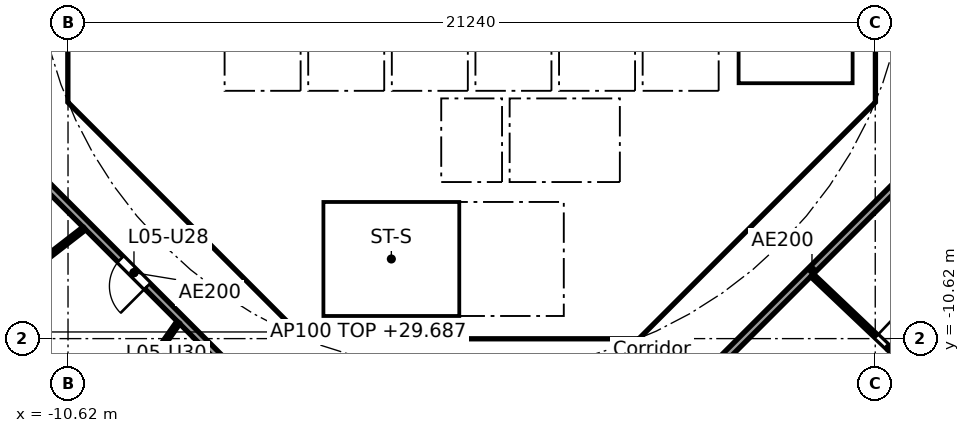
"""IFC4 building model, lengths in metres.
Left out: names, types, materials, properties, quantities, classifications, styles, units other than length and angle.
Written with IfcOpenShell. Run it as: python <this file> out.ifc"""

import sys

from ifc_helpers import new_model, si_unit, direction, frame, frame_2d, origin, place, context, subcontext, project, spatial, polyline, rectangle, outline, extrude, element, fill, save


model = new_model("IFC4")
c1 = context("Model", 3, precision=1e-05, world=origin(), true_north=direction((0.0, 1.0)))
c2 = subcontext(c1, "Body", "Model", "MODEL_VIEW")
j1 = project(units=[si_unit("LENGTHUNIT", "METRE"), si_unit("PLANEANGLEUNIT", "RADIAN")], contexts=[c1])
p1 = place(None, origin())
s1 = spatial("IfcSite", under=j1, at=p1, CompositionType="ELEMENT")
p2 = place(p1, origin())
s2 = spatial("IfcBuilding", under=s1, at=p2, CompositionType="ELEMENT")
p3 = place(p2, frame((0.0, 0.0, 27.0)))
s3 = spatial("IfcBuildingStorey", under=s2, at=p3, CompositionType="ELEMENT", Elevation=27.0)
p4 = place(p3, frame((-10.325, 3.801, 0.0), z_axis=(0.0, 0.0, 1.0), x_axis=(0.0, -1.0, 0.0)))
e1 = element("IfcWall", 1, at=p4, inside=s3, PredefinedType="SHEAR", context=c2, shape_type="SweptSolid", body=[
    extrude(rectangle(XDim=7.602, YDim=0.6, at=frame_2d((3.801, 0.0))), origin(), (0.0, 0.0, 1.0), 3.44),
])
p5 = place(p4, frame((0.651, 0.0, 0.0)))
e2 = element("IfcOpeningElement", 2, at=p5, cuts=e1, PredefinedType="OPENING", context=c2, shape_type="SweptSolid", body=[
    extrude(rectangle(XDim=1.5, YDim=2.1, at=frame_2d((0.75, 1.05))), frame((0.0, 0.31, 0.0), z_axis=(0.0, -1.0, 0.0), x_axis=(1.0, 0.0, 0.0)), (0.0, 0.0, 1.0), 0.62),
])
p6 = place(p4, frame((5.451, 0.0, 0.0)))
e3 = element("IfcOpeningElement", 3, at=p6, cuts=e1, PredefinedType="OPENING", context=c2, shape_type="SweptSolid", body=[
    extrude(rectangle(XDim=1.5, YDim=2.1, at=frame_2d((0.75, 1.05))), frame((0.0, 0.31, 0.0), z_axis=(0.0, -1.0, 0.0), x_axis=(1.0, 0.0, 0.0)), (0.0, 0.0, 1.0), 0.62),
])
p7 = place(p3, frame((-9.988, -4.613, 0.0), z_axis=(0.0, 0.0, 1.0), x_axis=(0.707106781187, -0.707106781187, 0.0)))
e4 = element("IfcWall", 4, at=p7, inside=s3, PredefinedType="SHEAR", context=c2, shape_type="SweptSolid", body=[
    extrude(rectangle(XDim=7.602, YDim=0.6, at=frame_2d((3.801, 0.0))), origin(), (0.0, 0.0, 1.0), 3.44),
])
p8 = place(p7, frame((6.151, 0.0, 0.0)))
e5 = element("IfcOpeningElement", 5, at=p8, cuts=e4, PredefinedType="OPENING", context=c2, shape_type="SweptSolid", body=[
    extrude(rectangle(XDim=1.1, YDim=2.1, at=frame_2d((0.55, 1.05))), frame((0.0, 0.31, 0.0), z_axis=(0.0, -1.0, 0.0), x_axis=(1.0, 0.0, 0.0)), (0.0, 0.0, 1.0), 0.62),
])
p9 = place(p3, frame((4.613, -9.988, 0.0), z_axis=(0.0, 0.0, 1.0), x_axis=(0.707106781187, 0.707106781187, 0.0)))
e6 = element("IfcWall", 6, at=p9, inside=s3, PredefinedType="SHEAR", context=c2, shape_type="SweptSolid", body=[
    extrude(rectangle(XDim=7.602, YDim=0.6, at=frame_2d((3.801, 0.0))), origin(), (0.0, 0.0, 1.0), 3.44),
])
p10 = place(p9, frame((3.201, 0.0, 0.0)))
e7 = element("IfcOpeningElement", 7, at=p10, cuts=e6, PredefinedType="OPENING", context=c2, shape_type="SweptSolid", body=[
    extrude(rectangle(XDim=1.2, YDim=2.1, at=frame_2d((0.6, 1.05))), frame((0.0, 0.31, 0.0), z_axis=(0.0, -1.0, 0.0), x_axis=(1.0, 0.0, 0.0)), (0.0, 0.0, 1.0), 0.62),
])
p11 = place(p3, frame((4.0, -10.025, 0.0), z_axis=(0.0, 0.0, 1.0), x_axis=(0.0, 1.0, 0.0)))
e8 = element("IfcWall", 8, at=p11, inside=s3, PredefinedType="SOLIDWALL", context=c2, shape_type="SweptSolid", body=[
    extrude(rectangle(XDim=3.0, YDim=0.2, at=frame_2d((1.5, 0.0))), origin(), (0.0, 0.0, 1.0), 3.44),
])
p12 = place(p11, frame((0.975, 0.0, 0.0)))
e9 = element("IfcOpeningElement", 9, at=p12, cuts=e8, PredefinedType="OPENING", context=c2, shape_type="SweptSolid", body=[
    extrude(rectangle(XDim=1.1, YDim=2.1, at=frame_2d((0.55, 1.05))), frame((0.0, 0.11, 0.0), z_axis=(0.0, -1.0, 0.0), x_axis=(1.0, 0.0, 0.0)), (0.0, 0.0, 1.0), 0.22),
])
p13 = place(p3, frame((-5.8, -8.227, 0.0), z_axis=(0.0, 0.0, 1.0), x_axis=(0.0, 1.0, 0.0)))
e10 = element("IfcWall", 10, at=p13, inside=s3, PredefinedType="PARTITIONING", context=c2, shape_type="SweptSolid", body=[
    extrude(rectangle(XDim=3.927, YDim=0.15, at=frame_2d((1.963, 0.0))), origin(), (0.0, 0.0, 1.0), 3.44),
])
p14 = place(p13, frame((2.615, 0.0, 0.0)))
e11 = element("IfcOpeningElement", 11, at=p14, cuts=e10, PredefinedType="OPENING", context=c2, shape_type="SweptSolid", body=[
    extrude(rectangle(XDim=0.9, YDim=2.1, at=frame_2d((0.45, 1.05))), frame((0.0, 0.085, 0.0), z_axis=(0.0, -1.0, 0.0), x_axis=(1.0, 0.0, 0.0)), (0.0, 0.0, 1.0), 0.17),
])
p15 = place(p13, frame((0.539, 0.0, 0.0)))
e12 = element("IfcOpeningElement", 12, at=p15, cuts=e10, PredefinedType="OPENING", context=c2, shape_type="SweptSolid", body=[
    extrude(rectangle(XDim=0.9, YDim=2.1, at=frame_2d((0.45, 1.05))), frame((0.0, 0.085, 0.0), z_axis=(0.0, -1.0, 0.0), x_axis=(1.0, 0.0, 0.0)), (0.0, 0.0, 1.0), 0.17),
])
p16 = place(p3, frame((4.0, -6.5, 0.0), z_axis=(0.0, 0.0, 1.0), x_axis=(0.0, 1.0, 0.0)))
e13 = element("IfcWall", 13, at=p16, inside=s3, PredefinedType="SOLIDWALL", context=c2, shape_type="SweptSolid", body=[
    extrude(rectangle(XDim=2.2, YDim=0.2, at=frame_2d((1.1, 0.0))), origin(), (0.0, 0.0, 1.0), 3.44),
])
p17 = place(p16, frame((0.55, 0.0, 0.0)))
e14 = element("IfcOpeningElement", 14, at=p17, cuts=e13, PredefinedType="OPENING", context=c2, shape_type="SweptSolid", body=[
    extrude(rectangle(XDim=1.1, YDim=2.1, at=frame_2d((0.55, 1.05))), frame((0.0, 0.11, 0.0), z_axis=(0.0, -1.0, 0.0), x_axis=(1.0, 0.0, 0.0)), (0.0, 0.0, 1.0), 0.22),
])
p18 = place(p3, frame((-4.0, -6.5, 0.0), z_axis=(0.0, 0.0, 1.0), x_axis=(0.0, 1.0, 0.0)))
e15 = element("IfcWall", 15, at=p18, inside=s3, PredefinedType="SOLIDWALL", context=c2, shape_type="SweptSolid", body=[
    extrude(rectangle(XDim=2.2, YDim=0.2, at=frame_2d((1.1, 0.0))), origin(), (0.0, 0.0, 1.0), 3.44),
])
p19 = place(p18, frame((0.65, 0.0, 0.0)))
e16 = element("IfcOpeningElement", 16, at=p19, cuts=e15, PredefinedType="OPENING", context=c2, shape_type="SweptSolid", body=[
    extrude(rectangle(XDim=0.9, YDim=2.1, at=frame_2d((0.45, 1.05))), frame((0.0, 0.11, 0.0), z_axis=(0.0, -1.0, 0.0), x_axis=(1.0, 0.0, 0.0)), (0.0, 0.0, 1.0), 0.22),
])
p20 = place(p3, origin())
e17 = element("IfcWall", 17, at=p20, inside=s3, PredefinedType="SHEAR", context=c2, shape_type="SweptSolid", body=[
    extrude(outline(polyline([(-10.625, -3.801), (-10.025, -3.801), (-10.025, -4.152), (-9.776, -4.401), (-10.2, -4.825), (-10.625, -4.401), (-10.625, -3.801)])), origin(), (0.0, 0.0, 1.0), 3.44),
])
p21 = place(p3, origin())
e18 = element("IfcWall", 18, at=p21, inside=s3, PredefinedType="SHEAR", context=c2, shape_type="SweptSolid", body=[
    extrude(outline(polyline([(-4.152, -10.025), (4.152, -10.025), (4.401, -9.776), (4.825, -10.2), (4.401, -10.625), (-4.401, -10.625), (-4.825, -10.2), (-4.401, -9.776), (-4.152, -10.025)])), origin(), (0.0, 0.0, 1.0), 3.44),
])
p22 = place(p3, origin())
e19 = element("IfcWall", 19, at=p22, inside=s3, PredefinedType="SHEAR", context=c2, shape_type="SweptSolid", body=[
    extrude(outline(polyline([(9.776, -4.401), (10.025, -4.152), (10.025, -3.801), (10.025, 4.152), (9.776, 4.401), (10.2, 4.825), (10.625, 4.401), (10.625, -4.401), (10.2, -4.825), (9.776, -4.401)])), origin(), (0.0, 0.0, 1.0), 3.44),
])
p23 = place(p3, frame((-10.025, -4.0, 0.0), z_axis=(0.0, 0.0, 1.0), x_axis=(1.0, 0.0, 0.0)))
e20 = element("IfcWall", 20, at=p23, inside=s3, PredefinedType="PARTITIONING", context=c2, shape_type="SweptSolid", body=[
    extrude(rectangle(XDim=3.325, YDim=0.2, at=frame_2d((1.662, 0.0))), origin(), (0.0, 0.0, 1.0), 3.44),
])
p24 = place(p3, frame((-8.001, -6.1, 0.0), z_axis=(0.0, 0.0, 1.0), x_axis=(1.0, 0.0, 0.0)))
e21 = element("IfcWall", 21, at=p24, inside=s3, PredefinedType="PARTITIONING", context=c2, shape_type="SweptSolid", body=[
    extrude(rectangle(XDim=2.126, YDim=0.15, at=frame_2d((1.063, 0.0))), origin(), (0.0, 0.0, 1.0), 3.44),
])
for number, where, z_axis, x_axis in (
    (22, (-0.9, -6.5, 0.0), (0.0, 0.0, 1.0), (0.0, 1.0, 0.0)),
    (23, (0.9, -6.5, 0.0), (0.0, 0.0, 1.0), (0.0, 1.0, 0.0)),
):
    element("IfcWall", number, at=place(p3, frame(where, z_axis=z_axis, x_axis=x_axis)), inside=s3, PredefinedType="SOLIDWALL", context=c2, shape_type="SweptSolid", body=[
        extrude(rectangle(XDim=2.2, YDim=0.2, at=frame_2d((1.1, 0.0))), origin(), (0.0, 0.0, 1.0), 3.44),
    ])
p25 = place(p3, origin())
e24 = element("IfcWall", 24, at=p25, inside=s3, PredefinedType="SOLIDWALL", context=c2, shape_type="SweptSolid", body=[
    extrude(outline(polyline([(-6.7, -2.1), (-6.5, -2.1), (-6.5, -4.1), (-4.5, -4.1), (-4.5, -2.1), (-4.3, -2.1), (-4.3, -4.1), (-2.3, -4.1), (-2.3, -2.1), (-2.1, -2.1), (-2.1, -4.1), (-0.1, -4.1), (-0.1, -2.1), (0.1, -2.1), (0.1, -4.1), (2.1, -4.1), (2.1, -2.1), (2.3, -2.1), (2.3, -4.1), (4.3, -4.1), (4.3, -2.1), (4.5, -2.1), (4.5, -4.1), (6.5, -4.1), (6.5, -2.1), (6.7, -2.1), (6.7, -4.3), (-6.7, -4.3), (-6.7, -2.1)])), origin(), (0.0, 0.0, 1.0), 3.44),
])
p26 = place(p3, origin())
e25 = element("IfcWall", 25, at=p26, inside=s3, PredefinedType="SOLIDWALL", context=c2, shape_type="SweptSolid", body=[
    extrude(outline(polyline([(-3.9, -10.025), (-4.1, -10.025), (-4.1, -7.025), (-3.9, -7.025), (-3.9, -10.025)])), origin(), (0.0, 0.0, 1.0), 3.44),
])
p27 = place(p3, origin())
e26 = element("IfcWall", 26, at=p27, inside=s3, PredefinedType="SOLIDWALL", context=c2, shape_type="SweptSolid", body=[
    extrude(outline(polyline([(4.1, -7.025), (-4.1, -7.025), (-4.1, -6.5), (4.1, -6.5), (4.1, -7.025)])), origin(), (0.0, 0.0, 1.0), 3.44),
])
p28 = place(p3, origin())
e27 = element("IfcWall", 27, at=p28, inside=s3, PredefinedType="SOLIDWALL", context=c2, shape_type="SweptSolid", body=[
    extrude(outline(polyline([(7.025, -3.9), (6.7, -3.9), (6.7, 3.9), (7.025, 3.9), (7.025, -3.9)])), origin(), (0.0, 0.0, 1.0), 3.44),
])
p29 = place(p3, origin())
e28 = element("IfcWall", 28, at=p29, inside=s3, PredefinedType="SOLIDWALL", context=c2, shape_type="SweptSolid", body=[
    extrude(outline(polyline([(10.025, -4.1), (6.7, -4.1), (6.7, -3.9), (10.025, -3.9), (10.025, -4.1)])), origin(), (0.0, 0.0, 1.0), 3.44),
])
p30 = place(p3, frame((-12.635, -5.134, 0.0), z_axis=(0.0, 0.0, 1.0), x_axis=(0.707106781187, -0.707106781187, 0.0)))
e29 = element("IfcWall", 29, at=p30, inside=s3, PredefinedType="PARTITIONING", context=c2, shape_type="SweptSolid", body=[
    extrude(rectangle(XDim=10.609, YDim=0.2, at=frame_2d((5.305, 0.0))), origin(), (0.0, 0.0, 1.0), 3.44),
])
p31 = place(p30, frame((4.804, 0.0, 0.0)))
e30 = element("IfcOpeningElement", 30, at=p31, cuts=e29, PredefinedType="OPENING", context=c2, shape_type="SweptSolid", body=[
    extrude(rectangle(XDim=1.0, YDim=2.1, at=frame_2d((0.5, 1.05))), frame((0.0, 0.11, 0.0), z_axis=(0.0, -1.0, 0.0), x_axis=(1.0, 0.0, 0.0)), (0.0, 0.0, 1.0), 0.22),
])
p32 = place(p3, frame((5.275, -12.494, 0.0), z_axis=(0.0, 0.0, 1.0), x_axis=(0.707106781187, 0.707106781187, 0.0)))
e31 = element("IfcWall", 31, at=p32, inside=s3, PredefinedType="PARTITIONING", context=c2, shape_type="SweptSolid", body=[
    extrude(rectangle(XDim=10.409, YDim=0.2, at=frame_2d((5.205, 0.0))), origin(), (0.0, 0.0, 1.0), 3.44),
])
p33 = place(p3, frame((-10.19, -7.719, 0.0), z_axis=(0.0, 0.0, 1.0), x_axis=(-0.790264549439, -0.612765813259, 0.0)))
e32 = element("IfcWall", 32, at=p33, inside=s3, PredefinedType="PARTITIONING", context=c2, shape_type="SweptSolid", body=[
    extrude(rectangle(XDim=8.896, YDim=0.1, at=frame_2d((4.448, 0.0))), origin(), (0.0, 0.0, 1.0), 2.687),
])
p34 = place(p33, frame((1.448, 0.0, 0.0)))
e33 = element("IfcOpeningElement", 33, at=p34, cuts=e32, PredefinedType="OPENING", context=c2, shape_type="SweptSolid", body=[
    extrude(rectangle(XDim=0.9, YDim=2.1, at=frame_2d((0.45, 1.05))), frame((0.0, 0.06, 0.0), z_axis=(0.0, -1.0, 0.0), x_axis=(1.0, 0.0, 0.0)), (0.0, 0.0, 1.0), 0.12),
])
p35 = place(p33, frame((5.871, 0.0, 0.0)))
e34 = element("IfcOpeningElement", 34, at=p35, cuts=e32, PredefinedType="OPENING", context=c2, shape_type="SweptSolid", body=[
    extrude(rectangle(XDim=0.9, YDim=2.1, at=frame_2d((0.45, 1.05))), frame((0.0, 0.06, 0.0), z_axis=(0.0, -1.0, 0.0), x_axis=(1.0, 0.0, 0.0)), (0.0, 0.0, 1.0), 0.12),
])
p36 = place(p3, frame((-7.715, -10.193, 0.0), z_axis=(0.0, 0.0, 1.0), x_axis=(-0.573126964124, -0.819466584428, 0.0)))
e35 = element("IfcWall", 35, at=p36, inside=s3, PredefinedType="PARTITIONING", context=c2, shape_type="SweptSolid", body=[
    extrude(rectangle(XDim=15.001, YDim=0.1, at=frame_2d((7.5, 0.0))), origin(), (0.0, 0.0, 1.0), 2.687),
])
p37 = place(p36, frame((1.678, 0.0, 0.0)))
e36 = element("IfcOpeningElement", 36, at=p37, cuts=e35, PredefinedType="OPENING", context=c2, shape_type="SweptSolid", body=[
    extrude(rectangle(XDim=0.9, YDim=2.1, at=frame_2d((0.45, 1.05))), frame((0.0, 0.06, 0.0), z_axis=(0.0, -1.0, 0.0), x_axis=(1.0, 0.0, 0.0)), (0.0, 0.0, 1.0), 0.12),
])
p38 = place(p36, frame((6.631, 0.0, 0.0)))
e37 = element("IfcOpeningElement", 37, at=p38, cuts=e35, PredefinedType="OPENING", context=c2, shape_type="SweptSolid", body=[
    extrude(rectangle(XDim=0.9, YDim=2.1, at=frame_2d((0.45, 1.05))), frame((0.0, 0.06, 0.0), z_axis=(0.0, -1.0, 0.0), x_axis=(1.0, 0.0, 0.0)), (0.0, 0.0, 1.0), 0.12),
])
p39 = place(p3, frame((8.957, -8.953, 0.0), z_axis=(0.0, 0.0, 1.0), x_axis=(0.725250022034, -0.688485588476, 0.0)))
e38 = element("IfcWall", 38, at=p39, inside=s3, PredefinedType="PARTITIONING", context=c2, shape_type="SweptSolid", body=[
    extrude(rectangle(XDim=12.963, YDim=0.1, at=frame_2d((6.481, 0.0))), origin(), (0.0, 0.0, 1.0), 2.687),
])
p40 = place(p39, frame((2.333, 0.0, 0.0)))
e39 = element("IfcOpeningElement", 39, at=p40, cuts=e38, PredefinedType="OPENING", context=c2, shape_type="SweptSolid", body=[
    extrude(rectangle(XDim=0.9, YDim=2.1, at=frame_2d((0.45, 1.05))), frame((0.0, 0.06, 0.0), z_axis=(0.0, -1.0, 0.0), x_axis=(1.0, 0.0, 0.0)), (0.0, 0.0, 1.0), 0.12),
])
p41 = place(p39, frame((8.79, 0.0, 0.0)))
e40 = element("IfcOpeningElement", 40, at=p41, cuts=e38, PredefinedType="OPENING", context=c2, shape_type="SweptSolid", body=[
    extrude(rectangle(XDim=0.9, YDim=2.1, at=frame_2d((0.45, 1.05))), frame((0.0, 0.06, 0.0), z_axis=(0.0, -1.0, 0.0), x_axis=(1.0, 0.0, 0.0)), (0.0, 0.0, 1.0), 0.12),
])
p42 = place(p17, origin())
e41 = element("IfcDoor", 41, at=p42, inside=s3, OperationType="DOUBLE_DOOR_SLIDING", PredefinedType="DOOR", context=c2, shape_type="SweptSolid", body=[
    extrude(rectangle(XDim=1.1, YDim=2.1, at=frame_2d((0.55, 1.05))), frame((0.0, 0.025, 0.0), z_axis=(0.0, -1.0, 0.0), x_axis=(1.0, 0.0, 0.0)), (0.0, 0.0, 1.0), 0.05),
])
fill(e14, e41)
p43 = place(p12, origin())
e42 = element("IfcDoor", 42, at=p43, inside=s3, OperationType="SINGLE_SWING_LEFT", PredefinedType="DOOR", context=c2, shape_type="SweptSolid", body=[
    extrude(rectangle(XDim=1.1, YDim=2.1, at=frame_2d((0.55, 1.05))), frame((0.0, 0.025, 0.0), z_axis=(0.0, -1.0, 0.0), x_axis=(1.0, 0.0, 0.0)), (0.0, 0.0, 1.0), 0.05),
])
fill(e9, e42)
p44 = place(p14, origin())
e43 = element("IfcDoor", 43, at=p44, inside=s3, OperationType="SINGLE_SWING_LEFT", PredefinedType="DOOR", context=c2, shape_type="SweptSolid", body=[
    extrude(rectangle(XDim=0.9, YDim=2.1, at=frame_2d((0.45, 1.05))), frame((0.0, 0.025, 0.0), z_axis=(0.0, -1.0, 0.0), x_axis=(1.0, 0.0, 0.0)), (0.0, 0.0, 1.0), 0.05),
])
fill(e11, e43)
p45 = place(p15, origin())
e44 = element("IfcDoor", 44, at=p45, inside=s3, OperationType="SINGLE_SWING_LEFT", PredefinedType="DOOR", context=c2, shape_type="SweptSolid", body=[
    extrude(rectangle(XDim=0.9, YDim=2.1, at=frame_2d((0.45, 1.05))), frame((0.0, 0.025, 0.0), z_axis=(0.0, -1.0, 0.0), x_axis=(1.0, 0.0, 0.0)), (0.0, 0.0, 1.0), 0.05),
])
fill(e12, e44)
p46 = place(p19, frame((0.9, 0.0, 0.0), x_axis=(-1.0, 0.0, 0.0)))
e45 = element("IfcDoor", 45, at=p46, inside=s3, OperationType="SINGLE_SWING_RIGHT", PredefinedType="DOOR", context=c2, shape_type="SweptSolid", body=[
    extrude(rectangle(XDim=0.9, YDim=2.1, at=frame_2d((0.45, 1.05))), frame((0.0, 0.025, 0.0), z_axis=(0.0, -1.0, 0.0), x_axis=(1.0, 0.0, 0.0)), (0.0, 0.0, 1.0), 0.05),
])
fill(e16, e45)
p47 = place(p10, origin())
e46 = element("IfcDoor", 46, at=p47, inside=s3, OperationType="SINGLE_SWING_LEFT", PredefinedType="DOOR", context=c2, shape_type="SweptSolid", body=[
    extrude(rectangle(XDim=1.2, YDim=2.1, at=frame_2d((0.6, 1.05))), frame((0.0, 0.025, 0.0), z_axis=(0.0, -1.0, 0.0), x_axis=(1.0, 0.0, 0.0)), (0.0, 0.0, 1.0), 0.05),
])
fill(e7, e46)
p48 = place(p6, origin())
e47 = element("IfcDoor", 47, at=p48, inside=s3, OperationType="DOUBLE_DOOR_SINGLE_SWING", PredefinedType="DOOR", context=c2, shape_type="SweptSolid", body=[
    extrude(rectangle(XDim=1.5, YDim=2.1, at=frame_2d((0.75, 1.05))), frame((0.0, 0.025, 0.0), z_axis=(0.0, -1.0, 0.0), x_axis=(1.0, 0.0, 0.0)), (0.0, 0.0, 1.0), 0.05),
])
fill(e3, e47)
p49 = place(p8, origin())
e48 = element("IfcDoor", 48, at=p49, inside=s3, OperationType="SINGLE_SWING_LEFT", PredefinedType="DOOR", context=c2, shape_type="SweptSolid", body=[
    extrude(rectangle(XDim=1.1, YDim=2.1, at=frame_2d((0.55, 1.05))), frame((0.0, 0.025, 0.0), z_axis=(0.0, -1.0, 0.0), x_axis=(1.0, 0.0, 0.0)), (0.0, 0.0, 1.0), 0.05),
])
fill(e5, e48)
p50 = place(p31, frame((1.0, 0.0, 0.0), x_axis=(-1.0, 0.0, 0.0)))
e49 = element("IfcDoor", 49, at=p50, inside=s3, OperationType="SINGLE_SWING_LEFT", PredefinedType="DOOR", context=c2, shape_type="SweptSolid", body=[
    extrude(rectangle(XDim=1.0, YDim=2.1, at=frame_2d((0.5, 1.05))), frame((0.0, 0.025, 0.0), z_axis=(0.0, -1.0, 0.0), x_axis=(1.0, 0.0, 0.0)), (0.0, 0.0, 1.0), 0.05),
])
fill(e30, e49)
p51 = place(p40, origin())
e50 = element("IfcDoor", 50, at=p51, inside=s3, OperationType="SINGLE_SWING_LEFT", PredefinedType="DOOR", context=c2, shape_type="SweptSolid", body=[
    extrude(rectangle(XDim=0.9, YDim=2.1, at=frame_2d((0.45, 1.05))), frame((0.0, 0.025, 0.0), z_axis=(0.0, -1.0, 0.0), x_axis=(1.0, 0.0, 0.0)), (0.0, 0.0, 1.0), 0.05),
])
fill(e39, e50)
save(model, sys.argv[1])
